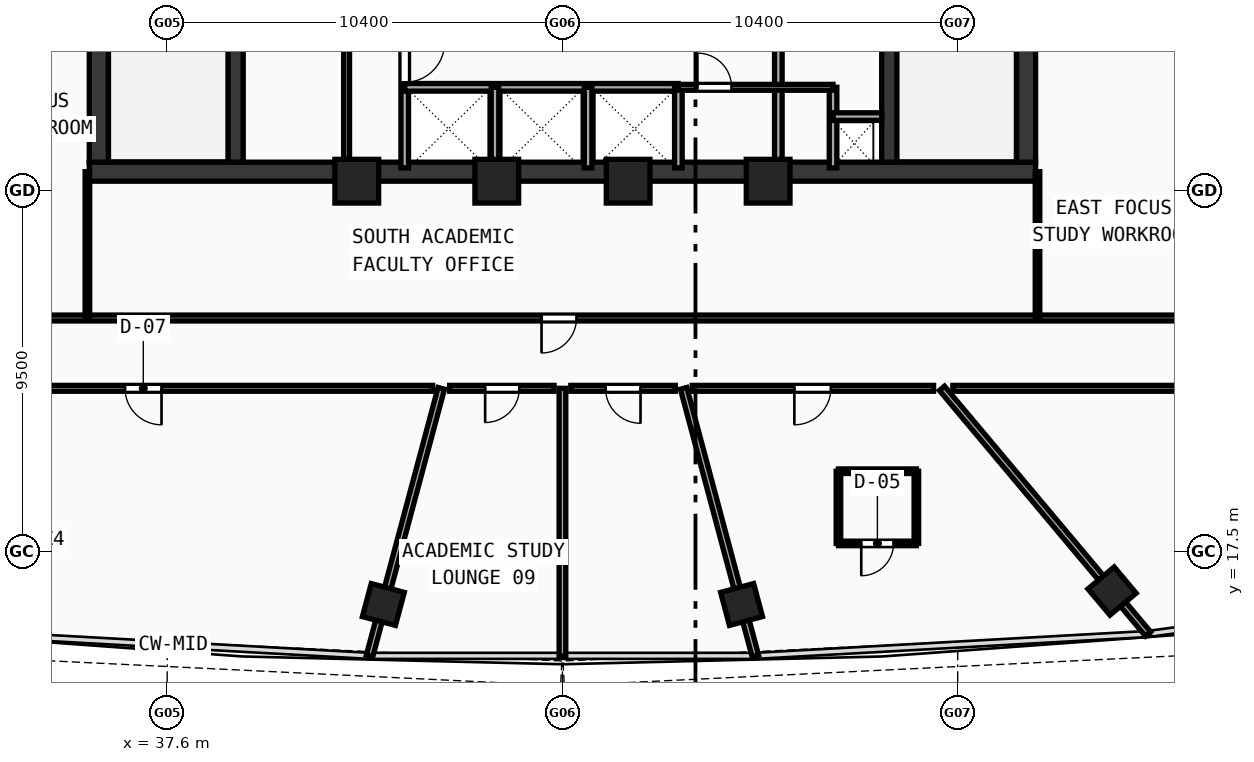
"""IFC4 building model, lengths in metres.
Left out: names, types, materials, properties, quantities, classifications, styles, units other than length and angle.
Written with IfcOpenShell. Run it as: python <this file> out.ifc"""

import sys

from ifc_helpers import new_model, si_unit, direction, frame, frame_2d, origin, origin_with_axes, origin_2d, place, context, subcontext, project, spatial, rectangle, hollow_rectangle, extrude, source, transform, mapped, element, fill, save


model = new_model("IFC4")
c1 = context("Model", 3, precision=1e-05, world=origin(), true_north=direction((0.0, 1.0)))
c2 = subcontext(c1, "Body", "Model", "MODEL_VIEW")
j1 = project(units=[si_unit("LENGTHUNIT", "METRE"), si_unit("PLANEANGLEUNIT", "RADIAN")], contexts=[c1])
p1 = place(None, origin())
s1 = spatial("IfcSite", under=j1, at=p1, CompositionType="ELEMENT")
p2 = place(p1, origin())
s2 = spatial("IfcBuilding", under=s1, at=p2, CompositionType="ELEMENT")
p3 = place(p2, frame((0.0, 0.0, 215.16)))
s3 = spatial("IfcBuildingStorey", under=s2, at=p3, CompositionType="ELEMENT", Elevation=215.16)
p4 = place(p3, frame((35.55, 27.5, 0.0), z_axis=(0.0, 0.0, 1.0), x_axis=(1.0, 0.0, 0.0)))
e1 = element("IfcWall", 1, at=p4, inside=s3, PredefinedType="SHEAR", context=c2, shape_type="SweptSolid", body=[
    extrude(rectangle(XDim=24.9, YDim=0.5, at=frame_2d((12.45, 0.0))), origin(), (0.0, 0.0, 1.0), 3.52),
])
for number, where, z_axis, x_axis in (
    (2, (35.8, 27.75, 0.0), (0.0, 0.0, 1.0), (0.0, 1.0, 0.0)),
    (3, (60.2, 27.75, 0.0), (0.0, 0.0, 1.0), (0.0, 1.0, 0.0)),
):
    element("IfcWall", number, at=place(p3, frame(where, z_axis=z_axis, x_axis=x_axis)), inside=s3, PredefinedType="SHEAR", context=c2, shape_type="SweptSolid", body=[
        extrude(rectangle(XDim=12.2, YDim=0.5, at=frame_2d((6.1, 0.0))), origin(), (0.0, 0.0, 1.0), 3.52),
    ])
p5 = place(p3, frame((39.4, 27.75, 0.0), z_axis=(0.0, 0.0, 1.0), x_axis=(0.0, 1.0, 0.0)))
e4 = element("IfcWall", 4, at=p5, inside=s3, PredefinedType="SHEAR", context=c2, shape_type="SweptSolid", body=[
    extrude(rectangle(XDim=12.2, YDim=0.4, at=frame_2d((6.1, 0.0))), origin(), (0.0, 0.0, 1.0), 3.52),
])
p6 = place(p5, frame((10.0, 0.0, 0.0)))
e5 = element("IfcOpeningElement", 5, at=p6, cuts=e4, PredefinedType="OPENING", context=c2, shape_type="SweptSolid", body=[
    extrude(rectangle(XDim=1.1, YDim=2.1, at=frame_2d((0.55, 1.05))), frame((0.0, 0.21, 0.0), z_axis=(0.0, -1.0, 0.0), x_axis=(1.0, 0.0, 0.0)), (0.0, 0.0, 1.0), 0.42),
])
p7 = place(p3, frame((56.6, 27.75, 0.0), z_axis=(0.0, 0.0, 1.0), x_axis=(0.0, 1.0, 0.0)))
e6 = element("IfcWall", 6, at=p7, inside=s3, PredefinedType="SHEAR", context=c2, shape_type="SweptSolid", body=[
    extrude(rectangle(XDim=12.2, YDim=0.4, at=frame_2d((6.1, 0.0))), origin(), (0.0, 0.0, 1.0), 3.52),
])
p8 = place(p7, frame((10.0, 0.0, 0.0)))
e7 = element("IfcOpeningElement", 7, at=p8, cuts=e6, PredefinedType="OPENING", context=c2, shape_type="SweptSolid", body=[
    extrude(rectangle(XDim=1.1, YDim=2.1, at=frame_2d((0.55, 1.05))), frame((0.0, 0.21, 0.0), z_axis=(0.0, -1.0, 0.0), x_axis=(1.0, 0.0, 0.0)), (0.0, 0.0, 1.0), 0.42),
])
m1 = source(origin(), c2, "Body", "SweptSolid", [
    extrude(hollow_rectangle(XDim=1.15, YDim=1.15, WallThickness=0.048, at=origin_2d()), origin(), (0.0, 0.0, 1.0), 3.78),
])
for number, where, z_axis, x_axis in (
    (8, (42.588, 27.25, -0.26), (0.0, 0.0, 1.0), (1.0, 0.0, 0.0)),
    (9, (46.272, 27.25, -0.26), (0.0, 0.0, 1.0), (1.0, 0.0, 0.0)),
    (10, (49.729, 27.25, -0.26), (0.0, 0.0, 1.0), (1.0, 0.0, 0.0)),
    (11, (53.412, 27.25, -0.26), (0.0, 0.0, 1.0), (1.0, 0.0, 0.0)),
):
    element("IfcColumn", number, at=place(p3, frame(where, z_axis=z_axis, x_axis=x_axis)), inside=s3, PredefinedType="COLUMN", context=c2, shape_type="MappedRepresentation", body=[
        mapped(m1, transform((0.0, 0.0, 0.0), scale=1.0)),
    ])
m2 = source(origin(), c2, "Body", "SweptSolid", [
    extrude(hollow_rectangle(XDim=0.9, YDim=0.9, WallThickness=0.036, at=origin_2d()), origin(), (0.0, 0.0, 1.0), 3.78),
])
for number, where, z_axis, x_axis in (
    (12, (43.288, 16.112, -0.26), (0.0, 0.0, 1.0), (0.966, -0.259, 0.0)),
    (13, (52.713, 16.112, -0.26), (0.0, 0.0, 1.0), (0.966, 0.259, 0.0)),
    (14, (62.461, 16.466, -0.26), (0.0, 0.0, 1.0), (0.766, 0.643, 0.0)),
):
    element("IfcColumn", number, at=place(p3, frame(where, z_axis=z_axis, x_axis=x_axis)), inside=s3, PredefinedType="COLUMN", context=c2, shape_type="MappedRepresentation", body=[
        mapped(m2, transform((0.0, 0.0, 0.0), scale=1.0)),
    ])
p9 = place(p3, frame((43.85, 27.6, 0.0), z_axis=(0.0, 0.0, 1.0), x_axis=(0.0, 1.0, 0.0)))
e15 = element("IfcWall", 15, at=p9, inside=s3, PredefinedType="SOLIDWALL", context=c2, shape_type="SweptSolid", body=[
    extrude(rectangle(XDim=6.22, YDim=0.2, at=frame_2d((3.11, 0.0))), origin(), (0.0, 0.0, 1.0), 3.52),
])
p10 = place(p9, frame((2.25, 0.0, 0.0)))
e16 = element("IfcOpeningElement", 16, at=p10, cuts=e15, PredefinedType="OPENING", context=c2, shape_type="SweptSolid", body=[
    extrude(rectangle(XDim=1.05, YDim=2.1, at=frame_2d((0.525, 1.05))), frame((0.0, 0.11, 0.0), z_axis=(0.0, -1.0, 0.0), x_axis=(1.0, 0.0, 0.0)), (0.0, 0.0, 1.0), 0.22),
])
p11 = place(p3, frame((53.68, 27.6, 0.0), z_axis=(0.0, 0.0, 1.0), x_axis=(0.0, 1.0, 0.0)))
e17 = element("IfcWall", 17, at=p11, inside=s3, PredefinedType="SOLIDWALL", context=c2, shape_type="SweptSolid", body=[
    extrude(rectangle(XDim=9.05, YDim=0.2, at=frame_2d((4.525, 0.0))), origin(), (0.0, 0.0, 1.0), 3.52),
])
p12 = place(p11, frame((6.9, 0.0, 0.0)))
e18 = element("IfcOpeningElement", 18, at=p12, cuts=e17, PredefinedType="OPENING", context=c2, shape_type="SweptSolid", body=[
    extrude(rectangle(XDim=1.05, YDim=2.1, at=frame_2d((0.525, 1.05))), frame((0.0, 0.11, 0.0), z_axis=(0.0, -1.0, 0.0), x_axis=(1.0, 0.0, 0.0)), (0.0, 0.0, 1.0), 0.22),
])
p13 = place(p3, frame((43.85, 29.72, 0.0), z_axis=(0.0, 0.0, 1.0), x_axis=(1.0, 0.0, 0.0)))
e19 = element("IfcWall", 19, at=p13, inside=s3, PredefinedType="SOLIDWALL", context=c2, shape_type="SweptSolid", body=[
    extrude(rectangle(XDim=7.2, YDim=0.2, at=frame_2d((3.6, 0.0))), origin(), (0.0, 0.0, 1.0), 3.52),
])
for number, where, z_axis, x_axis in (
    (20, (51.05, 27.6, 0.0), (0.0, 0.0, 1.0), (0.0, 1.0, 0.0)),
    (21, (46.225, 27.6, 0.0), (0.0, 0.0, 1.0), (0.0, 1.0, 0.0)),
    (22, (48.675, 27.6, 0.0), (0.0, 0.0, 1.0), (0.0, 1.0, 0.0)),
    (23, (55.12, 27.6, 0.0), (0.0, 0.0, 1.0), (0.0, 1.0, 0.0)),
):
    element("IfcWall", number, at=place(p3, frame(where, z_axis=z_axis, x_axis=x_axis)), inside=s3, PredefinedType="SOLIDWALL", context=c2, shape_type="SweptSolid", body=[
        extrude(rectangle(XDim=2.12, YDim=0.2, at=frame_2d((1.06, 0.0))), origin(), (0.0, 0.0, 1.0), 3.52),
    ])
p14 = place(p3, frame((55.12, 28.95, 0.0), z_axis=(0.0, 0.0, 1.0), x_axis=(1.0, 0.0, 0.0)))
e24 = element("IfcWall", 24, at=p14, inside=s3, PredefinedType="SOLIDWALL", context=c2, shape_type="SweptSolid", body=[
    extrude(rectangle(XDim=1.28, YDim=0.2, at=frame_2d((0.64, 0.0))), origin(), (0.0, 0.0, 1.0), 3.52),
])
p15 = place(p3, frame((42.32, 27.6, 0.0), z_axis=(0.0, 0.0, 1.0), x_axis=(0.0, 1.0, 0.0)))
e25 = element("IfcWall", 25, at=p15, inside=s3, PredefinedType="PARTITIONING", context=c2, shape_type="SweptSolid", body=[
    extrude(rectangle(XDim=5.9, YDim=0.155, at=frame_2d((2.95, 0.0))), origin(), (0.0, 0.0, 1.0), 3.52),
])
p16 = place(p15, frame((3.2, 0.0, 0.0)))
e26 = element("IfcOpeningElement", 26, at=p16, cuts=e25, PredefinedType="OPENING", context=c2, shape_type="SweptSolid", body=[
    extrude(rectangle(XDim=0.94, YDim=2.1, at=frame_2d((0.47, 1.05))), frame((0.0, 0.087, 0.0), z_axis=(0.0, -1.0, 0.0), x_axis=(1.0, 0.0, 0.0)), (0.0, 0.0, 1.0), 0.175),
])
p17 = place(p3, frame((51.05, 29.72, 0.0), z_axis=(0.0, 0.0, 1.0), x_axis=(1.0, 0.0, 0.0)))
e27 = element("IfcWall", 27, at=p17, inside=s3, PredefinedType="PARTITIONING", context=c2, shape_type="SweptSolid", body=[
    extrude(rectangle(XDim=4.07, YDim=0.155, at=frame_2d((2.035, 0.0))), origin(), (0.0, 0.0, 1.0), 3.52),
])
p18 = place(p17, frame((0.5, 0.0, 0.0)))
e28 = element("IfcOpeningElement", 28, at=p18, cuts=e27, PredefinedType="OPENING", context=c2, shape_type="SweptSolid", body=[
    extrude(rectangle(XDim=0.9, YDim=2.1, at=frame_2d((0.45, 1.05))), frame((0.0, 0.087, 0.0), z_axis=(0.0, -1.0, 0.0), x_axis=(1.0, 0.0, 0.0)), (0.0, 0.0, 1.0), 0.175),
])
p19 = place(p3, frame((31.45, 23.65, 0.0), z_axis=(0.0, 0.0, 1.0), x_axis=(1.0, 0.0, 0.0)))
e29 = element("IfcWall", 29, at=p19, inside=s3, PredefinedType="PARTITIONING", context=c2, shape_type="SweptSolid", body=[
    extrude(rectangle(XDim=33.1, YDim=0.155, at=frame_2d((16.55, 0.0))), origin(), (0.0, 0.0, 1.0), 2.87),
])
p20 = place(p19, frame((16.0, 0.0, 0.0)))
e30 = element("IfcOpeningElement", 30, at=p20, cuts=e29, PredefinedType="OPENING", context=c2, shape_type="SweptSolid", body=[
    extrude(rectangle(XDim=0.92, YDim=2.1, at=frame_2d((0.46, 1.05))), frame((0.0, 0.087, 0.0), z_axis=(0.0, -1.0, 0.0), x_axis=(1.0, 0.0, 0.0)), (0.0, 0.0, 1.0), 0.175),
])
for number, where, z_axis, x_axis in (
    (31, (35.5, 23.65, 0.0), (0.0, 0.0, 1.0), (0.0, 1.0, 0.0)),
    (32, (60.5, 23.65, 0.0), (0.0, 0.0, 1.0), (0.0, 1.0, 0.0)),
):
    element("IfcWall", number, at=place(p3, frame(where, z_axis=z_axis, x_axis=x_axis)), inside=s3, PredefinedType="PARTITIONING", context=c2, shape_type="SweptSolid", body=[
        extrude(rectangle(XDim=3.85, YDim=0.12, at=frame_2d((1.925, 0.0))), origin(), (0.0, 0.0, 1.0), 3.12),
    ])
p21 = place(p3, frame((44.811, 21.8, 0.0), z_axis=(0.0, 0.0, 1.0), x_axis=(-0.258817575638, -0.96592622003, 0.0)))
e33 = element("IfcWall", 33, at=p21, inside=s3, PredefinedType="PARTITIONING", context=c2, shape_type="SweptSolid", body=[
    extrude(rectangle(XDim=7.288, YDim=0.175, at=frame_2d((3.644, 0.0))), origin(), (0.0, 0.0, 1.0), 2.87),
])
p22 = place(p3, frame((48.0, 21.8, 0.0), z_axis=(0.0, 0.0, 1.0), x_axis=(0.0, -1.0, 0.0)))
e34 = element("IfcWall", 34, at=p22, inside=s3, PredefinedType="PARTITIONING", context=c2, shape_type="SweptSolid", body=[
    extrude(rectangle(XDim=7.04, YDim=0.175, at=frame_2d((3.52, 0.0))), origin(), (0.0, 0.0, 1.0), 2.87),
])
p23 = place(p3, frame((51.189, 21.8, 0.0), z_axis=(0.0, 0.0, 1.0), x_axis=(0.258817575638, -0.96592622003, 0.0)))
e35 = element("IfcWall", 35, at=p23, inside=s3, PredefinedType="PARTITIONING", context=c2, shape_type="SweptSolid", body=[
    extrude(rectangle(XDim=7.288, YDim=0.175, at=frame_2d((3.644, 0.0))), origin(), (0.0, 0.0, 1.0), 2.87),
])
p24 = place(p3, frame((57.985, 21.8, 0.0), z_axis=(0.0, 0.0, 1.0), x_axis=(0.642770599155, -0.766058716328, 0.0)))
e36 = element("IfcWall", 36, at=p24, inside=s3, PredefinedType="PARTITIONING", context=c2, shape_type="SweptSolid", body=[
    extrude(rectangle(XDim=8.438, YDim=0.175, at=frame_2d((4.219, 0.0))), origin(), (0.0, 0.0, 1.0), 2.87),
])
p25 = place(p3, frame((66.4, 21.8, 0.0), z_axis=(0.0, 0.0, 1.0), x_axis=(-1.0, 0.0, 0.0)))
e37 = element("IfcWall", 37, at=p25, inside=s3, PredefinedType="PARTITIONING", context=c2, shape_type="SweptSolid", body=[
    extrude(rectangle(XDim=8.127, YDim=0.155, at=frame_2d((4.064, 0.0))), origin(), (0.0, 0.0, 1.0), 3.12),
])
p26 = place(p3, frame((57.765, 21.8, 0.0), z_axis=(0.0, 0.0, 1.0), x_axis=(-1.0, 0.0, 0.0)))
e38 = element("IfcWall", 38, at=p26, inside=s3, PredefinedType="PARTITIONING", context=c2, shape_type="SweptSolid", body=[
    extrude(rectangle(XDim=6.349, YDim=0.155, at=frame_2d((3.174, 0.0))), origin(), (0.0, 0.0, 1.0), 2.87),
])
p27 = place(p26, frame((2.703, 0.0, 0.0)))
e39 = element("IfcOpeningElement", 39, at=p27, cuts=e38, PredefinedType="OPENING", context=c2, shape_type="SweptSolid", body=[
    extrude(rectangle(XDim=0.96, YDim=2.12, at=frame_2d((0.48, 1.06))), frame((0.0, 0.087, 0.0), z_axis=(0.0, -1.0, 0.0), x_axis=(1.0, 0.0, 0.0)), (0.0, 0.0, 1.0), 0.175),
])
p28 = place(p3, frame((50.969, 21.8, 0.0), z_axis=(0.0, 0.0, 1.0), x_axis=(-1.0, 0.0, 0.0)))
e40 = element("IfcWall", 40, at=p28, inside=s3, PredefinedType="PARTITIONING", context=c2, shape_type="SweptSolid", body=[
    extrude(rectangle(XDim=2.749, YDim=0.155, at=frame_2d((1.375, 0.0))), origin(), (0.0, 0.0, 1.0), 3.52),
])
p29 = place(p28, frame((0.915, 0.0, 0.0)))
e41 = element("IfcOpeningElement", 41, at=p29, cuts=e40, PredefinedType="OPENING", context=c2, shape_type="SweptSolid", body=[
    extrude(rectangle(XDim=0.92, YDim=2.1, at=frame_2d((0.46, 1.05))), frame((0.0, 0.087, 0.0), z_axis=(0.0, -1.0, 0.0), x_axis=(1.0, 0.0, 0.0)), (0.0, 0.0, 1.0), 0.175),
])
p30 = place(p3, frame((47.78, 21.8, 0.0), z_axis=(0.0, 0.0, 1.0), x_axis=(-1.0, 0.0, 0.0)))
e42 = element("IfcWall", 42, at=p30, inside=s3, PredefinedType="PARTITIONING", context=c2, shape_type="SweptSolid", body=[
    extrude(rectangle(XDim=2.749, YDim=0.155, at=frame_2d((1.375, 0.0))), origin(), (0.0, 0.0, 1.0), 3.52),
])
p31 = place(p30, frame((0.914, 0.0, 0.0)))
e43 = element("IfcOpeningElement", 43, at=p31, cuts=e42, PredefinedType="OPENING", context=c2, shape_type="SweptSolid", body=[
    extrude(rectangle(XDim=0.9, YDim=2.08, at=frame_2d((0.45, 1.04))), frame((0.0, 0.087, 0.0), z_axis=(0.0, -1.0, 0.0), x_axis=(1.0, 0.0, 0.0)), (0.0, 0.0, 1.0), 0.175),
])
p32 = place(p3, frame((44.583, 21.8, 0.0), z_axis=(0.0, 0.0, 1.0), x_axis=(-1.0, 0.0, 0.0)))
e44 = element("IfcWall", 44, at=p32, inside=s3, PredefinedType="PARTITIONING", context=c2, shape_type="SweptSolid", body=[
    extrude(rectangle(XDim=14.983, YDim=0.155, at=frame_2d((7.492, 0.0))), origin(), (0.0, 0.0, 1.0), 2.87),
])
p33 = place(p32, frame((7.133, 0.0, 0.0)))
e45 = element("IfcOpeningElement", 45, at=p33, cuts=e44, PredefinedType="OPENING", context=c2, shape_type="SweptSolid", body=[
    extrude(rectangle(XDim=0.96, YDim=2.12, at=frame_2d((0.48, 1.06))), frame((0.0, 0.087, 0.0), z_axis=(0.0, -1.0, 0.0), x_axis=(1.0, 0.0, 0.0)), (0.0, 0.0, 1.0), 0.175),
])
p34 = place(p3, frame((55.262, 17.719, 0.0), z_axis=(0.0, 0.0, 1.0), x_axis=(1.0, 0.0, 0.0)))
e46 = element("IfcWall", 46, at=p34, inside=s3, PredefinedType="PARTITIONING", context=c2, shape_type="SweptSolid", body=[
    extrude(rectangle(XDim=2.05, YDim=0.12, at=frame_2d((1.025, 0.0))), origin(), (0.0, 0.0, 1.0), 3.52),
])
p35 = place(p34, frame((0.6, 0.0, 0.0)))
e47 = element("IfcOpeningElement", 47, at=p35, cuts=e46, PredefinedType="OPENING", context=c2, shape_type="SweptSolid", body=[
    extrude(rectangle(XDim=0.85, YDim=2.1, at=frame_2d((0.425, 1.05))), frame((0.0, 0.07, 0.0), z_axis=(0.0, -1.0, 0.0), x_axis=(1.0, 0.0, 0.0)), (0.0, 0.0, 1.0), 0.14),
])
p36 = place(p3, frame((57.312, 17.719, 0.0), z_axis=(0.0, 0.0, 1.0), x_axis=(0.0, 1.0, 0.0)))
e48 = element("IfcWall", 48, at=p36, inside=s3, PredefinedType="PARTITIONING", context=c2, shape_type="SweptSolid", body=[
    extrude(rectangle(XDim=1.9, YDim=0.12, at=frame_2d((0.95, 0.0))), origin(), (0.0, 0.0, 1.0), 3.52),
])
p37 = place(p3, frame((57.312, 19.619, 0.0), z_axis=(0.0, 0.0, 1.0), x_axis=(-1.0, 0.0, 0.0)))
e49 = element("IfcWall", 49, at=p37, inside=s3, PredefinedType="PARTITIONING", context=c2, shape_type="SweptSolid", body=[
    extrude(rectangle(XDim=2.05, YDim=0.12, at=frame_2d((1.025, 0.0))), origin(), (0.0, 0.0, 1.0), 3.52),
])
p38 = place(p3, frame((55.262, 19.619, 0.0), z_axis=(0.0, 0.0, 1.0), x_axis=(0.0, -1.0, 0.0)))
e50 = element("IfcWall", 50, at=p38, inside=s3, PredefinedType="PARTITIONING", context=c2, shape_type="SweptSolid", body=[
    extrude(rectangle(XDim=1.9, YDim=0.12, at=frame_2d((0.95, 0.0))), origin(), (0.0, 0.0, 1.0), 3.52),
])
m3 = source(origin(), c2, "Body", "SweptSolid", [
    extrude(rectangle(XDim=1.05, YDim=2.1, at=frame_2d((0.525, 1.05))), frame((0.0, 0.025, 0.0), z_axis=(0.0, -1.0, 0.0), x_axis=(1.0, 0.0, 0.0)), (0.0, 0.0, 1.0), 0.05),
])
p39 = place(p10, frame((1.05, 0.0, 0.0), z_axis=(0.0, 0.0, 1.0), x_axis=(-1.0, 0.0, 0.0)))
e51 = element("IfcDoor", 51, at=p39, inside=s3, OperationType="SINGLE_SWING_LEFT", PredefinedType="DOOR", context=c2, shape_type="MappedRepresentation", body=[
    mapped(m3, transform((0.0, 0.0, 0.0), scale=1.0)),
])
fill(e16, e51)
m4 = source(origin(), c2, "Body", "SweptSolid", [
    extrude(rectangle(XDim=0.9, YDim=2.1, at=frame_2d((0.45, 1.05))), frame((0.0, 0.025, 0.0), z_axis=(0.0, -1.0, 0.0), x_axis=(1.0, 0.0, 0.0)), (0.0, 0.0, 1.0), 0.05),
])
p40 = place(p18, origin_with_axes())
e52 = element("IfcDoor", 52, at=p40, inside=s3, OperationType="SINGLE_SWING_LEFT", PredefinedType="DOOR", context=c2, shape_type="MappedRepresentation", body=[
    mapped(m4, transform((0.0, 0.0, 0.0), scale=1.0)),
])
fill(e28, e52)
m5 = source(origin(), c2, "Body", "SweptSolid", [
    extrude(rectangle(XDim=0.92, YDim=2.1, at=frame_2d((0.46, 1.05))), frame((0.0, 0.025, 0.0), z_axis=(0.0, -1.0, 0.0), x_axis=(1.0, 0.0, 0.0)), (0.0, 0.0, 1.0), 0.05),
])
p41 = place(p20, frame((0.92, 0.0, 0.0), z_axis=(0.0, 0.0, 1.0), x_axis=(-1.0, 0.0, 0.0)))
e53 = element("IfcDoor", 53, at=p41, inside=s3, OperationType="SINGLE_SWING_RIGHT", PredefinedType="DOOR", context=c2, shape_type="MappedRepresentation", body=[
    mapped(m5, transform((0.0, 0.0, 0.0), scale=1.0)),
])
fill(e30, e53)
m6 = source(origin(), c2, "Body", "SweptSolid", [
    extrude(rectangle(XDim=0.96, YDim=2.12, at=frame_2d((0.48, 1.06))), frame((0.0, 0.025, 0.0), z_axis=(0.0, -1.0, 0.0), x_axis=(1.0, 0.0, 0.0)), (0.0, 0.0, 1.0), 0.05),
])
p42 = place(p33, origin_with_axes())
e54 = element("IfcDoor", 54, at=p42, inside=s3, OperationType="SINGLE_SWING_LEFT", PredefinedType="DOOR", context=c2, shape_type="MappedRepresentation", body=[
    mapped(m6, transform((0.0, 0.0, 0.0), scale=1.0)),
])
fill(e45, e54)
m7 = source(origin(), c2, "Body", "SweptSolid", [
    extrude(rectangle(XDim=0.9, YDim=2.08, at=frame_2d((0.45, 1.04))), frame((0.0, 0.025, 0.0), z_axis=(0.0, -1.0, 0.0), x_axis=(1.0, 0.0, 0.0)), (0.0, 0.0, 1.0), 0.05),
])
p43 = place(p31, origin_with_axes())
e55 = element("IfcDoor", 55, at=p43, inside=s3, OperationType="SINGLE_SWING_RIGHT", PredefinedType="DOOR", context=c2, shape_type="MappedRepresentation", body=[
    mapped(m7, transform((0.0, 0.0, 0.0), scale=1.0)),
])
fill(e43, e55)
p44 = place(p29, origin_with_axes())
e56 = element("IfcDoor", 56, at=p44, inside=s3, OperationType="SINGLE_SWING_LEFT", PredefinedType="DOOR", context=c2, shape_type="MappedRepresentation", body=[
    mapped(m5, transform((0.0, 0.0, 0.0), scale=1.0)),
])
fill(e41, e56)
p45 = place(p27, origin_with_axes())
e57 = element("IfcDoor", 57, at=p45, inside=s3, OperationType="SINGLE_SWING_RIGHT", PredefinedType="DOOR", context=c2, shape_type="MappedRepresentation", body=[
    mapped(m6, transform((0.0, 0.0, 0.0), scale=1.0)),
])
fill(e39, e57)
m8 = source(origin(), c2, "Body", "SweptSolid", [
    extrude(rectangle(XDim=0.85, YDim=2.1, at=frame_2d((0.425, 1.05))), frame((0.0, 0.025, 0.0), z_axis=(0.0, -1.0, 0.0), x_axis=(1.0, 0.0, 0.0)), (0.0, 0.0, 1.0), 0.05),
])
p46 = place(p35, frame((0.85, 0.0, 0.0), z_axis=(0.0, 0.0, 1.0), x_axis=(-1.0, 0.0, 0.0)))
e58 = element("IfcDoor", 58, at=p46, inside=s3, OperationType="SINGLE_SWING_RIGHT", PredefinedType="DOOR", context=c2, shape_type="MappedRepresentation", body=[
    mapped(m8, transform((0.0, 0.0, 0.0), scale=1.0)),
])
fill(e47, e58)
save(model, sys.argv[1])
